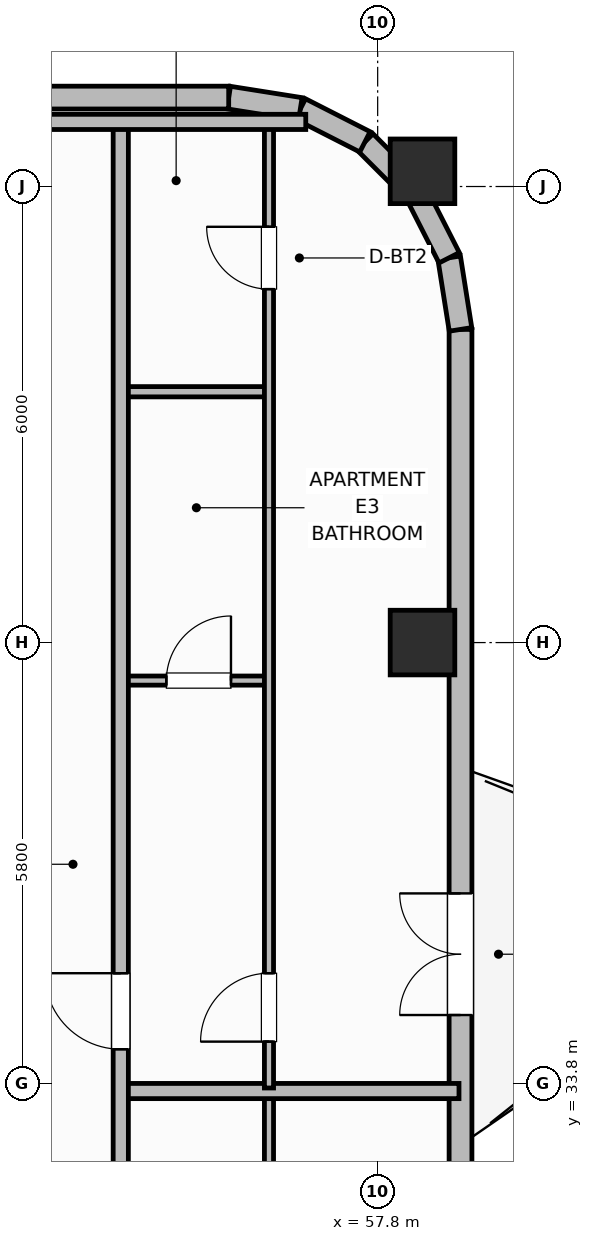
"""IFC4 building model, lengths in metres.
Left out: names, types, materials, properties, quantities, classifications, styles, units other than length and angle.
Written with IfcOpenShell. Run it as: python <this file> out.ifc"""

import sys

from ifc_helpers import new_model, si_unit, direction, frame, frame_2d, origin, origin_2d, place, context, subcontext, project, spatial, rectangle, extrude, element, fill, save


model = new_model("IFC4")
c1 = context("Model", 3, precision=1e-05, world=origin(), true_north=direction((0.0, 1.0)))
c2 = subcontext(c1, "Body", "Model", "MODEL_VIEW")
j1 = project(units=[si_unit("LENGTHUNIT", "METRE"), si_unit("PLANEANGLEUNIT", "RADIAN")], contexts=[c1])
p1 = place(None, origin())
s1 = spatial("IfcSite", under=j1, at=p1, CompositionType="ELEMENT")
p2 = place(p1, origin())
s2 = spatial("IfcBuilding", under=s1, at=p2, CompositionType="ELEMENT")
p3 = place(p2, frame((0.0, 0.0, 229.5)))
s3 = spatial("IfcBuildingStorey", under=s2, at=p3, CompositionType="ELEMENT", Elevation=229.5)
for number, where, z_axis, x_axis in (
    (1, (58.39, 39.6, 0.0), (0.0, 0.0, 1.0), (1.0, 0.0, 0.0)),
    (2, (58.39, 45.8, 0.0), (0.0, 0.0, 1.0), (1.0, 0.0, 0.0)),
):
    element("IfcColumn", number, at=place(p3, frame(where, z_axis=z_axis, x_axis=x_axis)), inside=s3, PredefinedType="COLUMN", context=c2, shape_type="SweptSolid", body=[
        extrude(rectangle(XDim=0.85, YDim=0.85, at=origin_2d()), origin(), (0.0, 0.0, 1.0), 3.7),
    ])
p4 = place(p3, frame((58.89, 32.6, 0.0), z_axis=(0.0, 0.0, 1.0), x_axis=(0.0, 1.0, 0.0)))
e3 = element("IfcWall", 3, at=p4, inside=s3, PredefinedType="SOLIDWALL", context=c2, shape_type="SweptSolid", body=[
    extrude(rectangle(XDim=11.12, YDim=0.3, at=frame_2d((5.56, 0.0))), origin(), (0.0, 0.0, 1.0), 2.73),
])
p5 = place(p4, frame((2.1, 0.0, 0.0)))
e4 = element("IfcOpeningElement", 4, at=p5, cuts=e3, PredefinedType="OPENING", context=c2, shape_type="SweptSolid", body=[
    extrude(rectangle(XDim=1.6, YDim=2.1, at=frame_2d((0.8, 1.05))), frame((0.0, 0.16, 0.0), z_axis=(0.0, -1.0, 0.0), x_axis=(1.0, 0.0, 0.0)), (0.0, 0.0, 1.0), 0.32),
])
p6 = place(p3, frame((58.89, 43.72, 0.0), z_axis=(0.0, 0.0, 1.0), x_axis=(-0.156304114255, 0.987708977314, 0.0)))
e5 = element("IfcWall", 5, at=p6, inside=s3, PredefinedType="SOLIDWALL", context=c2, shape_type="SweptSolid", body=[
    extrude(rectangle(XDim=0.954, YDim=0.3, at=frame_2d((0.477, 0.0))), origin(), (0.0, 0.0, 1.0), 2.73),
])
p7 = place(p3, frame((58.741, 44.663, 0.0), z_axis=(0.0, 0.0, 1.0), x_axis=(-0.45395644796, 0.891023873617, 0.0)))
e6 = element("IfcWall", 6, at=p7, inside=s3, PredefinedType="SOLIDWALL", context=c2, shape_type="SweptSolid", body=[
    extrude(rectangle(XDim=0.954, YDim=0.3, at=frame_2d((0.477, 0.0))), origin(), (0.0, 0.0, 1.0), 2.73),
])
for number, where, z_axis, x_axis in (
    (7, (58.308, 45.513, 0.0), (0.0, 0.0, 1.0), (-0.707, 0.707, 0.0)),
    (8, (57.633, 46.188, 0.0), (0.0, 0.0, 1.0), (-0.891, 0.454, 0.0)),
):
    element("IfcWall", number, at=place(p3, frame(where, z_axis=z_axis, x_axis=x_axis)), inside=s3, PredefinedType="SOLIDWALL", context=c2, shape_type="SweptSolid", body=[
        extrude(rectangle(XDim=0.954, YDim=0.3, at=frame_2d((0.477, 0.0))), origin(), (0.0, 0.0, 1.0), 2.73),
    ])
p8 = place(p3, frame((56.782, 46.621, 0.0), z_axis=(0.0, 0.0, 1.0), x_axis=(-0.987663181641, 0.156593229835, 0.0)))
e9 = element("IfcWall", 9, at=p8, inside=s3, PredefinedType="SOLIDWALL", context=c2, shape_type="SweptSolid", body=[
    extrude(rectangle(XDim=0.954, YDim=0.3, at=frame_2d((0.477, 0.0))), origin(), (0.0, 0.0, 1.0), 2.73),
])
p9 = place(p3, frame((55.84, 46.77, 0.0), z_axis=(0.0, 0.0, 1.0), x_axis=(-1.0, 0.0, 0.0)))
e10 = element("IfcWall", 10, at=p9, inside=s3, PredefinedType="SOLIDWALL", context=c2, shape_type="SweptSolid", body=[
    extrude(rectangle(XDim=33.28, YDim=0.3, at=frame_2d((16.64, 0.0))), origin(), (0.0, 0.0, 1.0), 2.73),
])
p10 = place(p9, frame((5.08, 0.0, 0.76)))
e11 = element("IfcOpeningElement", 11, at=p10, cuts=e10, PredefinedType="OPENING", context=c2, shape_type="SweptSolid", body=[
    extrude(rectangle(XDim=1.8, YDim=1.85, at=frame_2d((0.9, 0.925))), frame((0.0, 0.16, 0.0), z_axis=(0.0, -1.0, 0.0), x_axis=(1.0, 0.0, 0.0)), (0.0, 0.0, 1.0), 0.32),
])
p11 = place(p9, frame((8.633, 0.0, 0.76)))
e12 = element("IfcOpeningElement", 12, at=p11, cuts=e10, PredefinedType="OPENING", context=c2, shape_type="SweptSolid", body=[
    extrude(rectangle(XDim=1.8, YDim=1.85, at=frame_2d((0.9, 0.925))), frame((0.0, 0.16, 0.0), z_axis=(0.0, -1.0, 0.0), x_axis=(1.0, 0.0, 0.0)), (0.0, 0.0, 1.0), 0.32),
])
p12 = place(p9, frame((15.74, 0.0, 0.76)))
e13 = element("IfcOpeningElement", 13, at=p12, cuts=e10, PredefinedType="OPENING", context=c2, shape_type="SweptSolid", body=[
    extrude(rectangle(XDim=1.8, YDim=1.85, at=frame_2d((0.9, 0.925))), frame((0.0, 0.16, 0.0), z_axis=(0.0, -1.0, 0.0), x_axis=(1.0, 0.0, 0.0)), (0.0, 0.0, 1.0), 0.32),
])
p13 = place(p9, frame((22.847, 0.0, 0.76)))
e14 = element("IfcOpeningElement", 14, at=p13, cuts=e10, PredefinedType="OPENING", context=c2, shape_type="SweptSolid", body=[
    extrude(rectangle(XDim=1.8, YDim=1.85, at=frame_2d((0.9, 0.925))), frame((0.0, 0.16, 0.0), z_axis=(0.0, -1.0, 0.0), x_axis=(1.0, 0.0, 0.0)), (0.0, 0.0, 1.0), 0.32),
])
p14 = place(p9, frame((26.4, 0.0, 0.76)))
e15 = element("IfcOpeningElement", 15, at=p14, cuts=e10, PredefinedType="OPENING", context=c2, shape_type="SweptSolid", body=[
    extrude(rectangle(XDim=1.8, YDim=1.85, at=frame_2d((0.9, 0.925))), frame((0.0, 0.16, 0.0), z_axis=(0.0, -1.0, 0.0), x_axis=(1.0, 0.0, 0.0)), (0.0, 0.0, 1.0), 0.32),
])
p15 = place(p3, frame((56.37, 22.4, 0.0), z_axis=(0.0, 0.0, 1.0), x_axis=(0.0, 1.0, 0.0)))
e16 = element("IfcWall", 16, at=p15, inside=s3, PredefinedType="PARTITIONING", context=c2, shape_type="SweptSolid", body=[
    extrude(rectangle(XDim=11.26, YDim=0.12, at=frame_2d((5.63, 0.0))), origin(), (0.0, 0.0, 1.0), 2.56),
])
p16 = place(p15, frame((0.61, 0.0, 0.0)))
e17 = element("IfcOpeningElement", 17, at=p16, cuts=e16, PredefinedType="OPENING", context=c2, shape_type="SweptSolid", body=[
    extrude(rectangle(XDim=0.9, YDim=2.1, at=frame_2d((0.45, 1.05))), frame((0.0, 0.07, 0.0), z_axis=(0.0, -1.0, 0.0), x_axis=(1.0, 0.0, 0.0)), (0.0, 0.0, 1.0), 0.14),
])
p17 = place(p3, frame((54.42, 33.7, 0.0), z_axis=(0.0, 0.0, 1.0), x_axis=(1.0, 0.0, 0.0)))
e18 = element("IfcWall", 18, at=p17, inside=s3, PredefinedType="PARTITIONING", context=c2, shape_type="SweptSolid", body=[
    extrude(rectangle(XDim=4.45, YDim=0.2, at=frame_2d((2.225, 0.0))), origin(), (0.0, 0.0, 1.0), 2.56),
])
p18 = place(p3, frame((54.42, 39.1, 0.0), z_axis=(0.0, 0.0, 1.0), x_axis=(1.0, 0.0, 0.0)))
e19 = element("IfcWall", 19, at=p18, inside=s3, PredefinedType="PARTITIONING", context=c2, shape_type="SweptSolid", body=[
    extrude(rectangle(XDim=1.95, YDim=0.12, at=frame_2d((0.975, 0.0))), origin(), (0.0, 0.0, 1.0), 2.56),
])
p19 = place(p18, frame((0.6, 0.0, 0.0)))
e20 = element("IfcOpeningElement", 20, at=p19, cuts=e19, PredefinedType="OPENING", context=c2, shape_type="SweptSolid", body=[
    extrude(rectangle(XDim=0.85, YDim=2.1, at=frame_2d((0.425, 1.05))), frame((0.0, 0.07, 0.0), z_axis=(0.0, -1.0, 0.0), x_axis=(1.0, 0.0, 0.0)), (0.0, 0.0, 1.0), 0.14),
])
p20 = place(p3, frame((54.42, 42.9, 0.0), z_axis=(0.0, 0.0, 1.0), x_axis=(1.0, 0.0, 0.0)))
e21 = element("IfcWall", 21, at=p20, inside=s3, PredefinedType="PARTITIONING", context=c2, shape_type="SweptSolid", body=[
    extrude(rectangle(XDim=1.95, YDim=0.135, at=frame_2d((0.975, 0.0))), origin(), (0.0, 0.0, 1.0), 2.56),
])
p21 = place(p3, frame((56.37, 33.74, 0.0), z_axis=(0.0, 0.0, 1.0), x_axis=(0.0, 1.0, 0.0)))
e22 = element("IfcWall", 22, at=p21, inside=s3, PredefinedType="PARTITIONING", context=c2, shape_type="SweptSolid", body=[
    extrude(rectangle(XDim=12.67, YDim=0.12, at=frame_2d((6.335, 0.0))), origin(), (0.0, 0.0, 1.0), 2.56),
])
p22 = place(p21, frame((0.61, 0.0, 0.0)))
e23 = element("IfcOpeningElement", 23, at=p22, cuts=e22, PredefinedType="OPENING", context=c2, shape_type="SweptSolid", body=[
    extrude(rectangle(XDim=0.9, YDim=2.1, at=frame_2d((0.45, 1.05))), frame((0.0, 0.07, 0.0), z_axis=(0.0, -1.0, 0.0), x_axis=(1.0, 0.0, 0.0)), (0.0, 0.0, 1.0), 0.14),
])
p23 = place(p21, frame((10.51, 0.0, 0.0)))
e24 = element("IfcOpeningElement", 24, at=p23, cuts=e22, PredefinedType="OPENING", context=c2, shape_type="SweptSolid", body=[
    extrude(rectangle(XDim=0.82, YDim=2.08, at=frame_2d((0.41, 1.04))), frame((0.0, 0.07, 0.0), z_axis=(0.0, -1.0, 0.0), x_axis=(1.0, 0.0, 0.0)), (0.0, 0.0, 1.0), 0.14),
])
p24 = place(p3, frame((54.42, 9.95, 0.0), z_axis=(0.0, 0.0, 1.0), x_axis=(0.0, 1.0, 0.0)))
e25 = element("IfcWall", 25, at=p24, inside=s3, PredefinedType="PARTITIONING", context=c2, shape_type="SweptSolid", body=[
    extrude(rectangle(XDim=36.5, YDim=0.2, at=frame_2d((18.25, 0.0))), origin(), (0.0, 0.0, 1.0), 2.56),
])
p25 = place(p24, frame((3.25, 0.0, 0.0)))
e26 = element("IfcOpeningElement", 26, at=p25, cuts=e25, PredefinedType="OPENING", context=c2, shape_type="SweptSolid", body=[
    extrude(rectangle(XDim=1.0, YDim=2.15, at=frame_2d((0.5, 1.075))), frame((0.0, 0.11, 0.0), z_axis=(0.0, -1.0, 0.0), x_axis=(1.0, 0.0, 0.0)), (0.0, 0.0, 1.0), 0.22),
])
p26 = place(p24, frame((12.96, 0.0, 0.0)))
e27 = element("IfcOpeningElement", 27, at=p26, cuts=e25, PredefinedType="OPENING", context=c2, shape_type="SweptSolid", body=[
    extrude(rectangle(XDim=1.0, YDim=2.15, at=frame_2d((0.5, 1.075))), frame((0.0, 0.11, 0.0), z_axis=(0.0, -1.0, 0.0), x_axis=(1.0, 0.0, 0.0)), (0.0, 0.0, 1.0), 0.22),
])
p27 = place(p24, frame((24.3, 0.0, 0.0)))
e28 = element("IfcOpeningElement", 28, at=p27, cuts=e25, PredefinedType="OPENING", context=c2, shape_type="SweptSolid", body=[
    extrude(rectangle(XDim=1.0, YDim=2.15, at=frame_2d((0.5, 1.075))), frame((0.0, 0.11, 0.0), z_axis=(0.0, -1.0, 0.0), x_axis=(1.0, 0.0, 0.0)), (0.0, 0.0, 1.0), 0.22),
])
p28 = place(p3, frame((53.1, 46.45, 0.0), z_axis=(0.0, 0.0, 1.0), x_axis=(1.0, 0.0, 0.0)))
e29 = element("IfcWall", 29, at=p28, inside=s3, PredefinedType="PARTITIONING", context=c2, shape_type="SweptSolid", body=[
    extrude(rectangle(XDim=3.754, YDim=0.2, at=frame_2d((1.877, 0.0))), origin(), (0.0, 0.0, 1.0), 2.56),
])
p29 = place(p5, origin())
e30 = element("IfcDoor", 30, at=p29, inside=s3, OperationType="DOUBLE_DOOR_SINGLE_SWING", PredefinedType="DOOR", context=c2, shape_type="SweptSolid", body=[
    extrude(rectangle(XDim=1.6, YDim=2.1, at=frame_2d((0.8, 1.05))), frame((0.0, 0.025, 0.0), z_axis=(0.0, -1.0, 0.0), x_axis=(1.0, 0.0, 0.0)), (0.0, 0.0, 1.0), 0.05),
])
fill(e4, e30)
p30 = place(p19, origin())
e31 = element("IfcDoor", 31, at=p30, inside=s3, OperationType="SINGLE_SWING_RIGHT", PredefinedType="DOOR", context=c2, shape_type="SweptSolid", body=[
    extrude(rectangle(XDim=0.85, YDim=2.1, at=frame_2d((0.425, 1.05))), frame((0.0, 0.025, 0.0), z_axis=(0.0, -1.0, 0.0), x_axis=(1.0, 0.0, 0.0)), (0.0, 0.0, 1.0), 0.05),
])
fill(e20, e31)
p31 = place(p22, origin())
e32 = element("IfcDoor", 32, at=p31, inside=s3, OperationType="SINGLE_SWING_LEFT", PredefinedType="DOOR", context=c2, shape_type="SweptSolid", body=[
    extrude(rectangle(XDim=0.9, YDim=2.1, at=frame_2d((0.45, 1.05))), frame((0.0, 0.025, 0.0), z_axis=(0.0, -1.0, 0.0), x_axis=(1.0, 0.0, 0.0)), (0.0, 0.0, 1.0), 0.05),
])
fill(e23, e32)
p32 = place(p23, origin())
e33 = element("IfcDoor", 33, at=p32, inside=s3, OperationType="SINGLE_SWING_RIGHT", PredefinedType="DOOR", context=c2, shape_type="SweptSolid", body=[
    extrude(rectangle(XDim=0.82, YDim=2.08, at=frame_2d((0.41, 1.04))), frame((0.0, 0.025, 0.0), z_axis=(0.0, -1.0, 0.0), x_axis=(1.0, 0.0, 0.0)), (0.0, 0.0, 1.0), 0.05),
])
fill(e24, e33)
p33 = place(p27, origin())
e34 = element("IfcDoor", 34, at=p33, inside=s3, OperationType="SINGLE_SWING_RIGHT", PredefinedType="DOOR", context=c2, shape_type="SweptSolid", body=[
    extrude(rectangle(XDim=1.0, YDim=2.15, at=frame_2d((0.5, 1.075))), frame((0.0, 0.025, 0.0), z_axis=(0.0, -1.0, 0.0), x_axis=(1.0, 0.0, 0.0)), (0.0, 0.0, 1.0), 0.05),
])
fill(e28, e34)
save(model, sys.argv[1])
